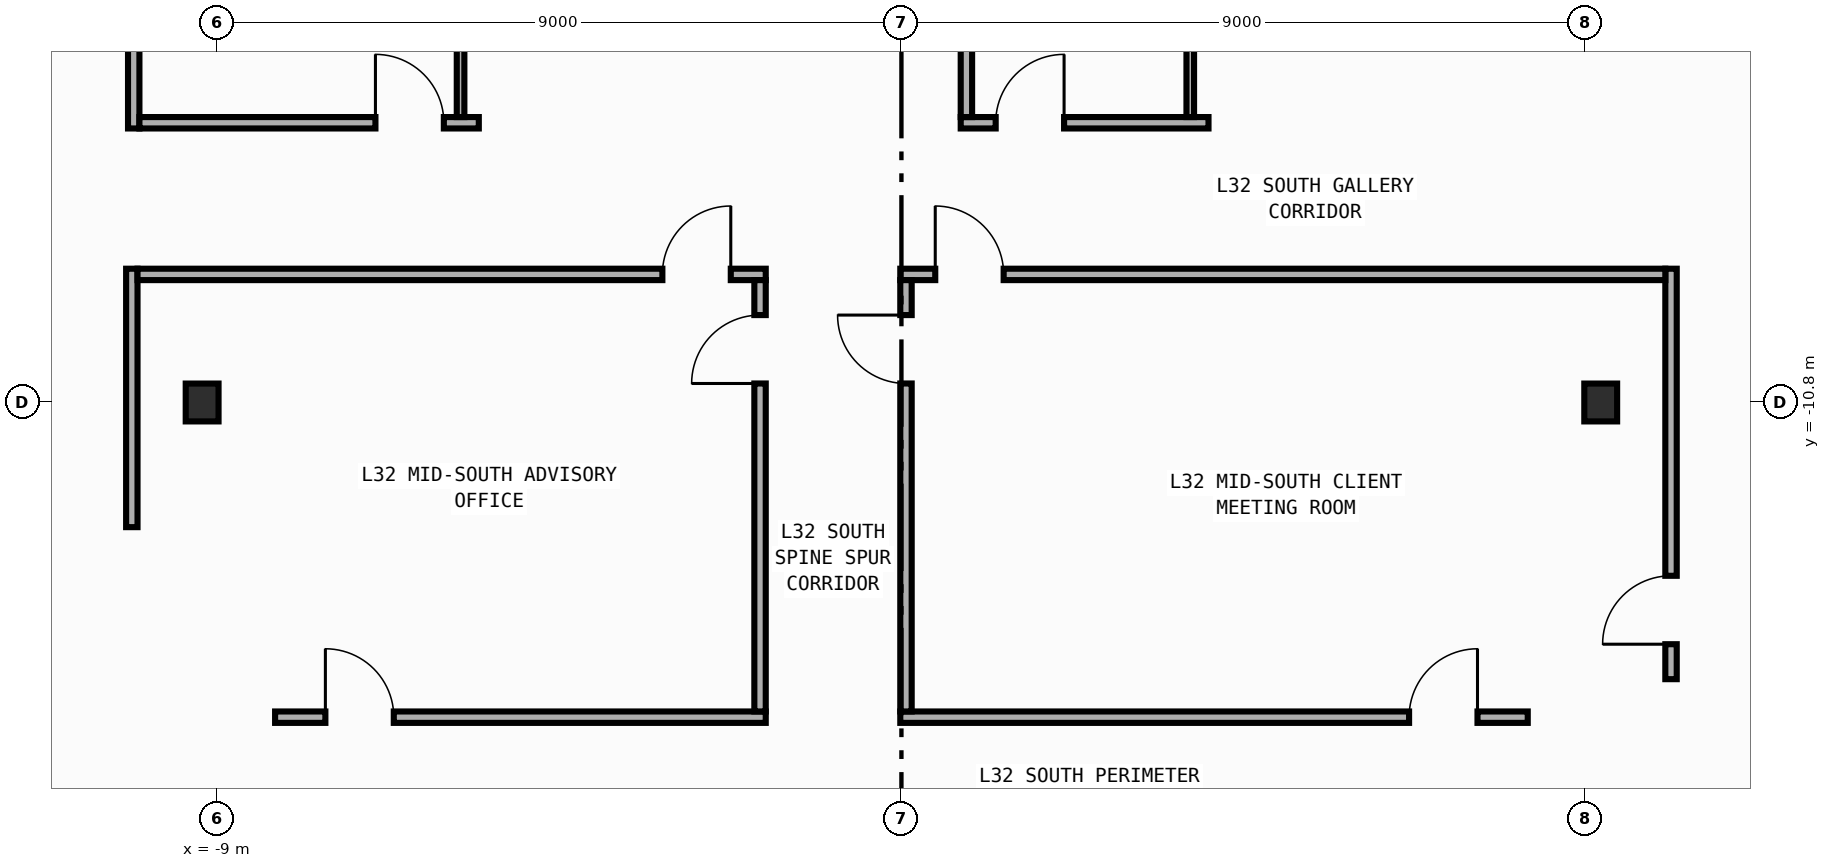
"""IFC4 building model, lengths in metres.
Left out: names, types, materials, properties, quantities, classifications, styles, units other than length and angle.
Written with IfcOpenShell. Run it as: python <this file> out.ifc"""

import sys

from ifc_helpers import new_model, si_unit, direction, frame, frame_2d, origin, origin_2d, place, context, subcontext, project, spatial, rectangle, i_section, extrude, element, fill, save


model = new_model("IFC4")
c1 = context("Model", 3, precision=1e-05, world=origin(), true_north=direction((0.0, 1.0)))
c2 = subcontext(c1, "Body", "Model", "MODEL_VIEW")
j1 = project(units=[si_unit("LENGTHUNIT", "METRE"), si_unit("PLANEANGLEUNIT", "RADIAN")], contexts=[c1])
p1 = place(None, origin())
s1 = spatial("IfcSite", under=j1, at=p1, CompositionType="ELEMENT")
p2 = place(p1, origin())
s2 = spatial("IfcBuilding", under=s1, at=p2, CompositionType="ELEMENT")
p3 = place(p2, frame((0.0, 0.0, 139.4)))
s3 = spatial("IfcBuildingStorey", under=s2, at=p3, CompositionType="ELEMENT", Elevation=139.4)
for number, where, z_axis, x_axis in (
    (1, (-9.2, -10.8, 0.0), (0.0, 0.0, 1.0), (1.0, 0.0, 0.0)),
    (2, (9.2, -10.8, 0.0), (0.0, 0.0, 1.0), (1.0, 0.0, 0.0)),
):
    element("IfcColumn", number, at=place(p3, frame(where, z_axis=z_axis, x_axis=x_axis)), inside=s3, PredefinedType="COLUMN", context=c2, shape_type="SweptSolid", body=[
        extrude(i_section(OverallWidth=0.432, OverallDepth=0.498, WebThickness=0.045, FlangeThickness=0.07, FilletRadius=0.022, at=origin_2d()), origin(), (0.0, 0.0, 1.0), 4.2),
    ])
p4 = place(p3, frame((-10.1, -7.195, 0.0), z_axis=(0.0, 0.0, 1.0), x_axis=(0.0, 1.0, 0.0)))
e3 = element("IfcWall", 3, at=p4, inside=s3, PredefinedType="PARTITIONING", context=c2, shape_type="SweptSolid", body=[
    extrude(rectangle(XDim=4.275, YDim=0.15, at=frame_2d((2.138, 0.0))), origin(), (0.0, 0.0, 1.0), 3.94),
])
p5 = place(p4, frame((1.278, 0.0, 0.0)))
e4 = element("IfcOpeningElement", 4, at=p5, cuts=e3, PredefinedType="OPENING", context=c2, shape_type="SweptSolid", body=[
    extrude(rectangle(XDim=0.9, YDim=2.15, at=frame_2d((0.45, 1.075))), frame((0.0, 0.085, 0.0), z_axis=(0.0, -1.0, 0.0), x_axis=(1.0, 0.0, 0.0)), (0.0, 0.0, 1.0), 0.17),
])
p6 = place(p3, frame((-10.125, -12.44, 0.0), z_axis=(0.0, 0.0, 1.0), x_axis=(0.0, 1.0, 0.0)))
e5 = element("IfcWall", 5, at=p6, inside=s3, PredefinedType="PARTITIONING", context=c2, shape_type="SweptSolid", body=[
    extrude(rectangle(XDim=3.4, YDim=0.15, at=frame_2d((1.7, 0.0))), origin(), (0.0, 0.0, 1.0), 3.94),
])
p7 = place(p3, frame((10.125, -14.44, 0.0), z_axis=(0.0, 0.0, 1.0), x_axis=(0.0, 1.0, 0.0)))
e6 = element("IfcWall", 6, at=p7, inside=s3, PredefinedType="PARTITIONING", context=c2, shape_type="SweptSolid", body=[
    extrude(rectangle(XDim=5.4, YDim=0.15, at=frame_2d((2.7, 0.0))), origin(), (0.0, 0.0, 1.0), 3.94),
])
p8 = place(p7, frame((0.46, 0.0, 0.0)))
e7 = element("IfcOpeningElement", 7, at=p8, cuts=e6, PredefinedType="OPENING", context=c2, shape_type="SweptSolid", body=[
    extrude(rectangle(XDim=0.9, YDim=2.15, at=frame_2d((0.45, 1.075))), frame((0.0, 0.085, 0.0), z_axis=(0.0, -1.0, 0.0), x_axis=(1.0, 0.0, 0.0)), (0.0, 0.0, 1.0), 0.17),
])
p9 = place(p3, frame((0.78, -7.12, 0.0), z_axis=(0.0, 0.0, 1.0), x_axis=(1.0, 0.0, 0.0)))
e8 = element("IfcWall", 8, at=p9, inside=s3, PredefinedType="PARTITIONING", context=c2, shape_type="SweptSolid", body=[
    extrude(rectangle(XDim=3.26, YDim=0.15, at=frame_2d((1.63, 0.0))), origin(), (0.0, 0.0, 1.0), 3.94),
])
p10 = place(p9, frame((0.46, 0.0, 0.0)))
e9 = element("IfcOpeningElement", 9, at=p10, cuts=e8, PredefinedType="OPENING", context=c2, shape_type="SweptSolid", body=[
    extrude(rectangle(XDim=0.9, YDim=2.15, at=frame_2d((0.45, 1.075))), frame((0.0, 0.085, 0.0), z_axis=(0.0, -1.0, 0.0), x_axis=(1.0, 0.0, 0.0)), (0.0, 0.0, 1.0), 0.17),
])
p11 = place(p3, frame((-10.025, -7.12, 0.0), z_axis=(0.0, 0.0, 1.0), x_axis=(1.0, 0.0, 0.0)))
e10 = element("IfcWall", 10, at=p11, inside=s3, PredefinedType="PARTITIONING", context=c2, shape_type="SweptSolid", body=[
    extrude(rectangle(XDim=4.465, YDim=0.15, at=frame_2d((2.232, 0.0))), origin(), (0.0, 0.0, 1.0), 3.94),
])
p12 = place(p11, frame((3.105, 0.0, 0.0)))
e11 = element("IfcOpeningElement", 11, at=p12, cuts=e10, PredefinedType="OPENING", context=c2, shape_type="SweptSolid", body=[
    extrude(rectangle(XDim=0.9, YDim=2.15, at=frame_2d((0.45, 1.075))), frame((0.0, 0.085, 0.0), z_axis=(0.0, -1.0, 0.0), x_axis=(1.0, 0.0, 0.0)), (0.0, 0.0, 1.0), 0.17),
])
p13 = place(p3, frame((-10.05, -9.115, 0.0), z_axis=(0.0, 0.0, 1.0), x_axis=(1.0, 0.0, 0.0)))
e12 = element("IfcWall", 12, at=p13, inside=s3, PredefinedType="PARTITIONING", context=c2, shape_type="SweptSolid", body=[
    extrude(rectangle(XDim=8.265, YDim=0.15, at=frame_2d((4.133, 0.0))), origin(), (0.0, 0.0, 1.0), 3.94),
])
p14 = place(p13, frame((6.905, 0.0, 0.0)))
e13 = element("IfcOpeningElement", 13, at=p14, cuts=e12, PredefinedType="OPENING", context=c2, shape_type="SweptSolid", body=[
    extrude(rectangle(XDim=0.9, YDim=2.15, at=frame_2d((0.45, 1.075))), frame((0.0, 0.085, 0.0), z_axis=(0.0, -1.0, 0.0), x_axis=(1.0, 0.0, 0.0)), (0.0, 0.0, 1.0), 0.17),
])
p15 = place(p3, frame((-0.015, -9.115, 0.0), z_axis=(0.0, 0.0, 1.0), x_axis=(1.0, 0.0, 0.0)))
e14 = element("IfcWall", 14, at=p15, inside=s3, PredefinedType="PARTITIONING", context=c2, shape_type="SweptSolid", body=[
    extrude(rectangle(XDim=10.065, YDim=0.15, at=frame_2d((5.032, 0.0))), origin(), (0.0, 0.0, 1.0), 3.94),
])
p16 = place(p15, frame((0.46, 0.0, 0.0)))
e15 = element("IfcOpeningElement", 15, at=p16, cuts=e14, PredefinedType="OPENING", context=c2, shape_type="SweptSolid", body=[
    extrude(rectangle(XDim=0.9, YDim=2.15, at=frame_2d((0.45, 1.075))), frame((0.0, 0.085, 0.0), z_axis=(0.0, -1.0, 0.0), x_axis=(1.0, 0.0, 0.0)), (0.0, 0.0, 1.0), 0.17),
])
p17 = place(p3, frame((0.855, -7.045, 0.0), z_axis=(0.0, 0.0, 1.0), x_axis=(0.0, 1.0, 0.0)))
e16 = element("IfcWall", 16, at=p17, inside=s3, PredefinedType="PARTITIONING", context=c2, shape_type="SweptSolid", body=[
    extrude(rectangle(XDim=2.825, YDim=0.15, at=frame_2d((1.413, 0.0))), origin(), (0.0, 0.0, 1.0), 3.94),
])
p18 = place(p17, frame((1.264, 0.0, 0.0)))
e17 = element("IfcOpeningElement", 17, at=p18, cuts=e16, PredefinedType="OPENING", context=c2, shape_type="SweptSolid", body=[
    extrude(rectangle(XDim=0.9, YDim=2.15, at=frame_2d((0.45, 1.075))), frame((0.0, 0.085, 0.0), z_axis=(0.0, -1.0, 0.0), x_axis=(1.0, 0.0, 0.0)), (0.0, 0.0, 1.0), 0.17),
])
p19 = place(p3, frame((-8.24, -14.94, 0.0), z_axis=(0.0, 0.0, 1.0), x_axis=(1.0, 0.0, 0.0)))
e18 = element("IfcWall", 18, at=p19, inside=s3, PredefinedType="PARTITIONING", context=c2, shape_type="SweptSolid", body=[
    extrude(rectangle(XDim=6.455, YDim=0.15, at=frame_2d((3.228, 0.0))), origin(), (0.0, 0.0, 1.0), 3.94),
])
p20 = place(p19, frame((0.662, 0.0, 0.0)))
e19 = element("IfcOpeningElement", 19, at=p20, cuts=e18, PredefinedType="OPENING", context=c2, shape_type="SweptSolid", body=[
    extrude(rectangle(XDim=0.9, YDim=2.15, at=frame_2d((0.45, 1.075))), frame((0.0, 0.085, 0.0), z_axis=(0.0, -1.0, 0.0), x_axis=(1.0, 0.0, 0.0)), (0.0, 0.0, 1.0), 0.17),
])
p21 = place(p3, frame((-0.015, -14.94, 0.0), z_axis=(0.0, 0.0, 1.0), x_axis=(1.0, 0.0, 0.0)))
e20 = element("IfcWall", 20, at=p21, inside=s3, PredefinedType="PARTITIONING", context=c2, shape_type="SweptSolid", body=[
    extrude(rectangle(XDim=8.255, YDim=0.15, at=frame_2d((4.127, 0.0))), origin(), (0.0, 0.0, 1.0), 3.94),
])
p22 = place(p21, frame((6.694, 0.0, 0.0)))
e21 = element("IfcOpeningElement", 21, at=p22, cuts=e20, PredefinedType="OPENING", context=c2, shape_type="SweptSolid", body=[
    extrude(rectangle(XDim=0.9, YDim=2.15, at=frame_2d((0.45, 1.075))), frame((0.0, 0.085, 0.0), z_axis=(0.0, -1.0, 0.0), x_axis=(1.0, 0.0, 0.0)), (0.0, 0.0, 1.0), 0.17),
])
p23 = place(p3, frame((-1.86, -14.865, 0.0), z_axis=(0.0, 0.0, 1.0), x_axis=(0.0, 1.0, 0.0)))
e22 = element("IfcWall", 22, at=p23, inside=s3, PredefinedType="PARTITIONING", context=c2, shape_type="SweptSolid", body=[
    extrude(rectangle(XDim=5.675, YDim=0.15, at=frame_2d((2.837, 0.0))), origin(), (0.0, 0.0, 1.0), 3.94),
])
p24 = place(p23, frame((4.315, 0.0, 0.0)))
e23 = element("IfcOpeningElement", 23, at=p24, cuts=e22, PredefinedType="OPENING", context=c2, shape_type="SweptSolid", body=[
    extrude(rectangle(XDim=0.9, YDim=2.15, at=frame_2d((0.45, 1.075))), frame((0.0, 0.085, 0.0), z_axis=(0.0, -1.0, 0.0), x_axis=(1.0, 0.0, 0.0)), (0.0, 0.0, 1.0), 0.17),
])
p25 = place(p3, frame((0.06, -14.865, 0.0), z_axis=(0.0, 0.0, 1.0), x_axis=(0.0, 1.0, 0.0)))
e24 = element("IfcWall", 24, at=p25, inside=s3, PredefinedType="PARTITIONING", context=c2, shape_type="SweptSolid", body=[
    extrude(rectangle(XDim=5.675, YDim=0.15, at=frame_2d((2.837, 0.0))), origin(), (0.0, 0.0, 1.0), 3.94),
])
p26 = place(p25, frame((4.315, 0.0, 0.0)))
e25 = element("IfcOpeningElement", 25, at=p26, cuts=e24, PredefinedType="OPENING", context=c2, shape_type="SweptSolid", body=[
    extrude(rectangle(XDim=0.9, YDim=2.15, at=frame_2d((0.45, 1.075))), frame((0.0, 0.085, 0.0), z_axis=(0.0, -1.0, 0.0), x_axis=(1.0, 0.0, 0.0)), (0.0, 0.0, 1.0), 0.17),
])
p27 = place(p3, frame((3.8, -4.29, 0.0), z_axis=(0.0, 0.0, 1.0), x_axis=(0.0, -1.0, 0.0)))
e26 = element("IfcWall", 26, at=p27, inside=s3, PredefinedType="PARTITIONING", context=c2, shape_type="SweptSolid", body=[
    extrude(rectangle(XDim=2.755, YDim=0.1, at=frame_2d((1.377, 0.0))), origin(), (0.0, 0.0, 1.0), 3.94),
])
p28 = place(p3, frame((-5.8, -2.99, 0.0), z_axis=(0.0, 0.0, 1.0), x_axis=(0.0, -1.0, 0.0)))
e27 = element("IfcWall", 27, at=p28, inside=s3, PredefinedType="PARTITIONING", context=c2, shape_type="SweptSolid", body=[
    extrude(rectangle(XDim=4.055, YDim=0.1, at=frame_2d((2.027, 0.0))), origin(), (0.0, 0.0, 1.0), 3.94),
])
p29 = place(p8, origin())
e28 = element("IfcDoor", 28, at=p29, inside=s3, OperationType="SINGLE_SWING_LEFT", PredefinedType="DOOR", context=c2, shape_type="SweptSolid", body=[
    extrude(rectangle(XDim=0.9, YDim=2.15, at=frame_2d((0.45, 1.075))), frame((0.0, 0.025, 0.0), z_axis=(0.0, -1.0, 0.0), x_axis=(1.0, 0.0, 0.0)), (0.0, 0.0, 1.0), 0.05),
])
fill(e7, e28)
p30 = place(p10, origin())
e29 = element("IfcDoor", 29, at=p30, inside=s3, OperationType="SINGLE_SWING_RIGHT", PredefinedType="DOOR", context=c2, shape_type="SweptSolid", body=[
    extrude(rectangle(XDim=0.9, YDim=2.15, at=frame_2d((0.45, 1.075))), frame((0.0, 0.025, 0.0), z_axis=(0.0, -1.0, 0.0), x_axis=(1.0, 0.0, 0.0)), (0.0, 0.0, 1.0), 0.05),
])
fill(e9, e29)
p31 = place(p12, origin())
e30 = element("IfcDoor", 30, at=p31, inside=s3, OperationType="SINGLE_SWING_LEFT", PredefinedType="DOOR", context=c2, shape_type="SweptSolid", body=[
    extrude(rectangle(XDim=0.9, YDim=2.15, at=frame_2d((0.45, 1.075))), frame((0.0, 0.025, 0.0), z_axis=(0.0, -1.0, 0.0), x_axis=(1.0, 0.0, 0.0)), (0.0, 0.0, 1.0), 0.05),
])
fill(e11, e30)
p32 = place(p14, origin())
e31 = element("IfcDoor", 31, at=p32, inside=s3, OperationType="SINGLE_SWING_RIGHT", PredefinedType="DOOR", context=c2, shape_type="SweptSolid", body=[
    extrude(rectangle(XDim=0.9, YDim=2.15, at=frame_2d((0.45, 1.075))), frame((0.0, 0.025, 0.0), z_axis=(0.0, -1.0, 0.0), x_axis=(1.0, 0.0, 0.0)), (0.0, 0.0, 1.0), 0.05),
])
fill(e13, e31)
p33 = place(p16, origin())
e32 = element("IfcDoor", 32, at=p33, inside=s3, OperationType="SINGLE_SWING_LEFT", PredefinedType="DOOR", context=c2, shape_type="SweptSolid", body=[
    extrude(rectangle(XDim=0.9, YDim=2.15, at=frame_2d((0.45, 1.075))), frame((0.0, 0.025, 0.0), z_axis=(0.0, -1.0, 0.0), x_axis=(1.0, 0.0, 0.0)), (0.0, 0.0, 1.0), 0.05),
])
fill(e15, e32)
p34 = place(p20, origin())
e33 = element("IfcDoor", 33, at=p34, inside=s3, OperationType="SINGLE_SWING_LEFT", PredefinedType="DOOR", context=c2, shape_type="SweptSolid", body=[
    extrude(rectangle(XDim=0.9, YDim=2.15, at=frame_2d((0.45, 1.075))), frame((0.0, 0.025, 0.0), z_axis=(0.0, -1.0, 0.0), x_axis=(1.0, 0.0, 0.0)), (0.0, 0.0, 1.0), 0.05),
])
fill(e19, e33)
p35 = place(p22, origin())
e34 = element("IfcDoor", 34, at=p35, inside=s3, OperationType="SINGLE_SWING_RIGHT", PredefinedType="DOOR", context=c2, shape_type="SweptSolid", body=[
    extrude(rectangle(XDim=0.9, YDim=2.15, at=frame_2d((0.45, 1.075))), frame((0.0, 0.025, 0.0), z_axis=(0.0, -1.0, 0.0), x_axis=(1.0, 0.0, 0.0)), (0.0, 0.0, 1.0), 0.05),
])
fill(e21, e34)
p36 = place(p24, origin())
e35 = element("IfcDoor", 35, at=p36, inside=s3, OperationType="SINGLE_SWING_LEFT", PredefinedType="DOOR", context=c2, shape_type="SweptSolid", body=[
    extrude(rectangle(XDim=0.9, YDim=2.15, at=frame_2d((0.45, 1.075))), frame((0.0, 0.025, 0.0), z_axis=(0.0, -1.0, 0.0), x_axis=(1.0, 0.0, 0.0)), (0.0, 0.0, 1.0), 0.05),
])
fill(e23, e35)
p37 = place(p26, origin())
e36 = element("IfcDoor", 36, at=p37, inside=s3, OperationType="SINGLE_SWING_RIGHT", PredefinedType="DOOR", context=c2, shape_type="SweptSolid", body=[
    extrude(rectangle(XDim=0.9, YDim=2.15, at=frame_2d((0.45, 1.075))), frame((0.0, 0.025, 0.0), z_axis=(0.0, -1.0, 0.0), x_axis=(1.0, 0.0, 0.0)), (0.0, 0.0, 1.0), 0.05),
])
fill(e25, e36)
save(model, sys.argv[1])
